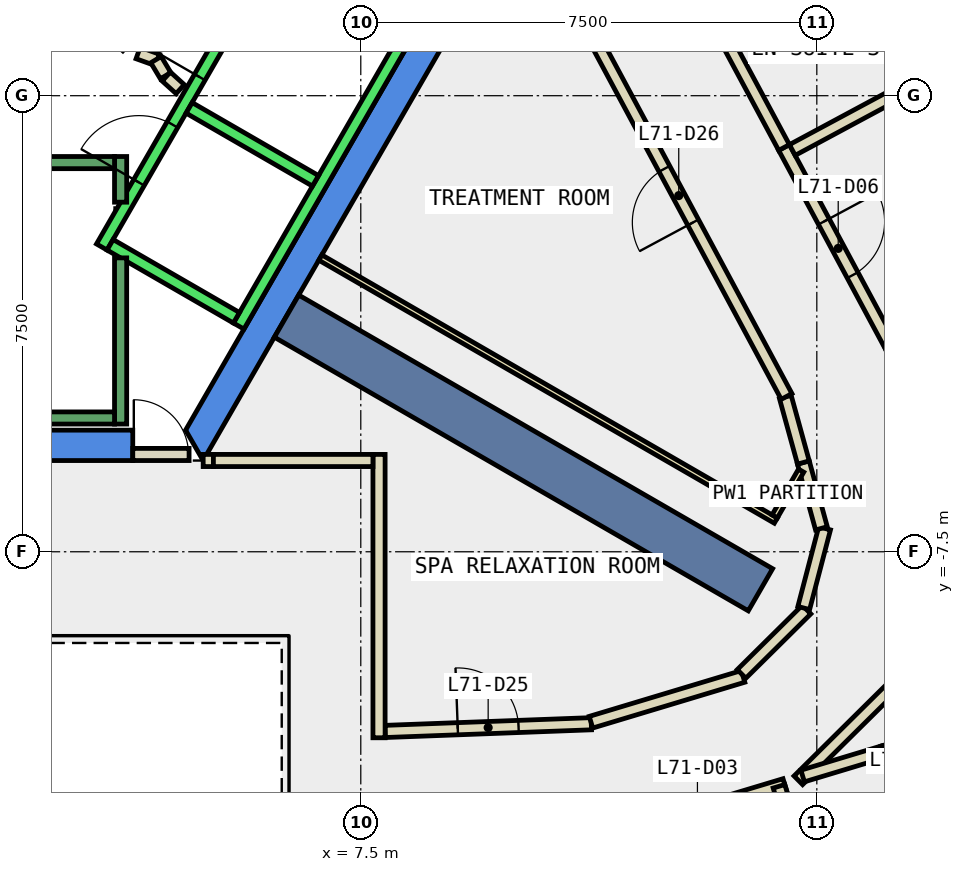
"""IFC4 building model, lengths in metres.
Left out: names, types, materials, properties, quantities, classifications, styles, units other than length and angle.
Written with IfcOpenShell. Run it as: python <this file> out.ifc"""

import sys

from ifc_helpers import new_model, si_unit, direction, frame, frame_2d, origin, place, context, subcontext, project, spatial, polyline, rectangle, outline, extrude, element, fill, save


model = new_model("IFC4")
c1 = context("Model", 3, precision=1e-05, world=origin(), true_north=direction((0.0, 1.0)))
c2 = subcontext(c1, "Body", "Model", "MODEL_VIEW")
j1 = project(units=[si_unit("LENGTHUNIT", "METRE"), si_unit("PLANEANGLEUNIT", "RADIAN")], contexts=[c1])
p1 = place(None, origin())
s1 = spatial("IfcSite", under=j1, at=p1, CompositionType="ELEMENT")
p2 = place(p1, origin())
s2 = spatial("IfcBuilding", under=s1, at=p2, CompositionType="ELEMENT")
p3 = place(p2, frame((0.0, 0.0, 304.4)))
s3 = spatial("IfcBuildingStorey", under=s2, at=p3, CompositionType="ELEMENT", Elevation=304.4)
p4 = place(p3, frame((0.0, 0.0, -0.34)))
e1 = element("IfcWall", 1, at=p4, inside=s3, PredefinedType="SHEAR", context=c2, shape_type="SweptSolid", body=[
    extrude(outline(polyline([(3.75, -6.0), (3.75, -5.5), (-4.619, -5.5), (-4.907, -6.0), (3.75, -6.0)])), origin(), (0.0, 0.0, 1.0), 3.6),
])
p5 = place(p3, frame((0.0, 0.0, -0.34)))
e2 = element("IfcWall", 2, at=p5, inside=s3, PredefinedType="SHEAR", context=c2, shape_type="SweptSolid", body=[
    extrude(outline(polyline([(4.907, -6.0), (9.815, 2.5), (9.238, 2.5), (4.619, -5.5), (4.907, -6.0)])), origin(), (0.0, 0.0, 1.0), 3.6),
])
p6 = place(p3, frame((6.279, -3.625, -0.34), z_axis=(0.0, 0.0, 1.0), x_axis=(0.866017533419, -0.500013631625, 0.0)))
e3 = element("IfcWall", 3, at=p6, inside=s3, PredefinedType="SHEAR", context=c2, shape_type="SweptSolid", body=[
    extrude(rectangle(XDim=9.0, YDim=0.8, at=frame_2d((4.5, 0.0))), origin(), (0.0, 0.0, 1.0), 3.6),
])
p7 = place(p3, frame((7.9, -10.455, 0.0), z_axis=(0.0, 0.0, 1.0), x_axis=(0.999297278907, 0.037482640915, 0.0)))
e4 = element("IfcWall", 4, at=p7, inside=s3, PredefinedType="PARTITIONING", context=c2, shape_type="SweptSolid", body=[
    extrude(rectangle(XDim=3.394, YDim=0.2, at=frame_2d((1.697, 0.0))), origin(), (0.0, 0.0, 1.0), 3.26),
])
p8 = place(p7, frame((1.196, 0.0, 0.0)))
e5 = element("IfcOpeningElement", 5, at=p8, cuts=e4, PredefinedType="OPENING", context=c2, shape_type="SweptSolid", body=[
    extrude(rectangle(XDim=1.0, YDim=2.1, at=frame_2d((0.5, 1.05))), frame((0.0, 0.11, 0.0), z_axis=(0.0, -1.0, 0.0), x_axis=(1.0, 0.0, 0.0)), (0.0, 0.0, 1.0), 0.22),
])
p9 = place(p3, frame((11.286, -10.303, 0.0), z_axis=(0.0, 0.0, 1.0), x_axis=(0.957555754851, 0.288248115955, 0.0)))
e6 = element("IfcWall", 6, at=p9, inside=s3, PredefinedType="PARTITIONING", context=c2, shape_type="SweptSolid", body=[
    extrude(rectangle(XDim=2.612, YDim=0.2, at=frame_2d((1.306, 0.0))), origin(), (0.0, 0.0, 1.0), 3.26),
])
p10 = place(p3, frame((13.762, -9.509, 0.0), z_axis=(0.0, 0.0, 1.0), x_axis=(0.710749293824, 0.703445407497, 0.0)))
e7 = element("IfcWall", 7, at=p10, inside=s3, PredefinedType="PARTITIONING", context=c2, shape_type="SweptSolid", body=[
    extrude(rectangle(XDim=1.504, YDim=0.2, at=frame_2d((0.752, 0.0))), origin(), (0.0, 0.0, 1.0), 3.26),
])
p11 = place(p3, frame((14.785, -8.425, 0.0), z_axis=(0.0, 0.0, 1.0), x_axis=(0.253295121261, 0.967389053869, 0.0)))
e8 = element("IfcWall", 8, at=p11, inside=s3, PredefinedType="PARTITIONING", context=c2, shape_type="SweptSolid", body=[
    extrude(rectangle(XDim=1.354, YDim=0.2, at=frame_2d((0.677, 0.0))), origin(), (0.0, 0.0, 1.0), 3.26),
])
p12 = place(p3, frame((15.076, -7.115, 0.0), z_axis=(0.0, 0.0, 1.0), x_axis=(-0.264368116744, 0.964421846937, 0.0)))
e9 = element("IfcWall", 9, at=p12, inside=s3, PredefinedType="PARTITIONING", context=c2, shape_type="SweptSolid", body=[
    extrude(rectangle(XDim=1.123, YDim=0.2, at=frame_2d((0.562, 0.0))), origin(), (0.0, 0.0, 1.0), 3.26),
])
p13 = place(p3, frame((14.779, -6.032, 0.0), z_axis=(0.0, 0.0, 1.0), x_axis=(-0.265740072272, 0.964044715762, 0.0)))
e10 = element("IfcWall", 10, at=p13, inside=s3, PredefinedType="PARTITIONING", context=c2, shape_type="SweptSolid", body=[
    extrude(rectangle(XDim=1.118, YDim=0.2, at=frame_2d((0.559, 0.0))), origin(), (0.0, 0.0, 1.0), 3.26),
])
p14 = place(p3, frame((14.503, -4.946, 0.0), z_axis=(0.0, 0.0, 1.0), x_axis=(-0.473101362557, 0.881008002658, 0.0)))
e11 = element("IfcWall", 11, at=p14, inside=s3, PredefinedType="PARTITIONING", context=c2, shape_type="SweptSolid", body=[
    extrude(rectangle(XDim=7.497, YDim=0.2, at=frame_2d((3.749, 0.0))), origin(), (0.0, 0.0, 1.0), 3.26),
])
p15 = place(p14, frame((3.249, 0.0, 0.0)))
e12 = element("IfcOpeningElement", 12, at=p15, cuts=e11, PredefinedType="OPENING", context=c2, shape_type="SweptSolid", body=[
    extrude(rectangle(XDim=1.0, YDim=2.1, at=frame_2d((0.5, 1.05))), frame((0.0, 0.11, 0.0), z_axis=(0.0, -1.0, 0.0), x_axis=(1.0, 0.0, 0.0)), (0.0, 0.0, 1.0), 0.22),
])
p16 = place(p3, frame((14.473, -11.328, 0.0), z_axis=(0.0, 0.0, 1.0), x_axis=(-0.957599689503, -0.288102125406, 0.0)))
e13 = element("IfcWall", 13, at=p16, inside=s3, PredefinedType="PARTITIONING", context=c2, shape_type="SweptSolid", body=[
    extrude(rectangle(XDim=2.999, YDim=0.2, at=frame_2d((1.5, 0.0))), origin(), (0.0, 0.0, 1.0), 3.26),
])
p17 = place(p16, frame((1.0, 0.0, 0.0)))
e14 = element("IfcOpeningElement", 14, at=p17, cuts=e13, PredefinedType="OPENING", context=c2, shape_type="SweptSolid", body=[
    extrude(rectangle(XDim=1.0, YDim=2.1, at=frame_2d((0.5, 1.05))), frame((0.0, 0.11, 0.0), z_axis=(0.0, -1.0, 0.0), x_axis=(1.0, 0.0, 0.0)), (0.0, 0.0, 1.0), 0.22),
])
p18 = place(p3, frame((16.537, -9.436, 0.0), z_axis=(0.0, 0.0, 1.0), x_axis=(-0.710773151724, -0.703421301063, 0.0)))
e15 = element("IfcWall", 15, at=p18, inside=s3, PredefinedType="PARTITIONING", context=c2, shape_type="SweptSolid", body=[
    extrude(rectangle(XDim=2.59, YDim=0.2, at=frame_2d((1.295, 0.0))), origin(), (0.0, 0.0, 1.0), 3.26),
])
p19 = place(p3, frame((14.461, -0.852, 0.0), z_axis=(0.0, 0.0, 1.0), x_axis=(0.473160180459, -0.88097641491, 0.0)))
e16 = element("IfcWall", 16, at=p19, inside=s3, PredefinedType="PARTITIONING", context=c2, shape_type="SweptSolid", body=[
    extrude(rectangle(XDim=3.766, YDim=0.2, at=frame_2d((1.883, 0.0))), origin(), (0.0, 0.0, 1.0), 3.26),
])
p20 = place(p19, frame((1.383, 0.0, 0.0)))
e17 = element("IfcOpeningElement", 17, at=p20, cuts=e16, PredefinedType="OPENING", context=c2, shape_type="SweptSolid", body=[
    extrude(rectangle(XDim=1.0, YDim=2.1, at=frame_2d((0.5, 1.05))), frame((0.0, 0.11, 0.0), z_axis=(0.0, -1.0, 0.0), x_axis=(1.0, 0.0, 0.0)), (0.0, 0.0, 1.0), 0.22),
])
p21 = place(p3, frame((12.947, 1.967, 0.0), z_axis=(0.0, 0.0, 1.0), x_axis=(0.473116768279, -0.88099972961, 0.0)))
e18 = element("IfcWall", 18, at=p21, inside=s3, PredefinedType="PARTITIONING", context=c2, shape_type="SweptSolid", body=[
    extrude(rectangle(XDim=3.2, YDim=0.2, at=frame_2d((1.6, 0.0))), origin(), (0.0, 0.0, 1.0), 3.26),
])
p22 = place(p3, frame((3.838, 0.702, 0.0), z_axis=(0.0, 0.0, 1.0), x_axis=(0.941035081519, -0.338308993895, 0.0)))
e19 = element("IfcWall", 19, at=p22, inside=s3, PredefinedType="PARTITIONING", context=c2, shape_type="SweptSolid", body=[
    extrude(rectangle(XDim=0.337, YDim=0.2, at=frame_2d((0.168, 0.0))), origin(), (0.0, 0.0, 1.0), 3.26),
])
p23 = place(p3, frame((4.132, 0.593, 0.0), z_axis=(0.0, 0.0, 1.0), x_axis=(0.513561617048, -0.858052717201, 0.0)))
e20 = element("IfcWall", 20, at=p23, inside=s3, PredefinedType="PARTITIONING", context=c2, shape_type="SweptSolid", body=[
    extrude(rectangle(XDim=0.308, YDim=0.2, at=frame_2d((0.154, 0.0))), origin(), (0.0, 0.0, 1.0), 3.26),
])
p24 = place(p3, frame((4.301, 0.315, 0.0), z_axis=(0.0, 0.0, 1.0), x_axis=(0.741798017506, -0.670623367639, 0.0)))
e21 = element("IfcWall", 21, at=p24, inside=s3, PredefinedType="PARTITIONING", context=c2, shape_type="SweptSolid", body=[
    extrude(rectangle(XDim=0.309, YDim=0.2, at=frame_2d((0.154, 0.0))), origin(), (0.0, 0.0, 1.0), 3.26),
])
p25 = place(p3, frame((4.908, -5.999, 0.0), z_axis=(0.0, 0.0, 1.0), x_axis=(1.0, 0.0, 0.0)))
e22 = element("IfcWall", 22, at=p25, inside=s3, PredefinedType="PARTITIONING", context=c2, shape_type="SweptSolid", body=[
    extrude(rectangle(XDim=0.168, YDim=0.2, at=frame_2d((0.084, 0.0))), origin(), (0.0, 0.0, 1.0), 2.4),
])
p26 = place(p3, frame((7.8, -5.899, 0.0), z_axis=(0.0, 0.0, 1.0), x_axis=(0.0, -1.0, 0.0)))
e23 = element("IfcWall", 23, at=p26, inside=s3, PredefinedType="PARTITIONING", context=c2, shape_type="SweptSolid", body=[
    extrude(rectangle(XDim=4.66, YDim=0.2, at=frame_2d((2.33, 0.0))), origin(), (0.0, 0.0, 1.0), 3.26),
])
p27 = place(p3, frame((6.835, -2.662, 0.0), z_axis=(0.0, 0.0, 1.0), x_axis=(0.866023427642, -0.500003422764, 0.0)))
e24 = element("IfcWall", 24, at=p27, inside=s3, PredefinedType="PARTITIONING", context=c2, shape_type="SweptSolid", body=[
    extrude(rectangle(XDim=8.65, YDim=0.1, at=frame_2d((4.325, 0.0))), origin(), (0.0, 0.0, 1.0), 3.26),
])
p28 = place(p3, frame((14.307, -6.919, 0.0), z_axis=(0.0, 0.0, 1.0), x_axis=(0.500305662732, 0.865848857387, 0.0)))
e25 = element("IfcWall", 25, at=p28, inside=s3, PredefinedType="PARTITIONING", context=c2, shape_type="SweptSolid", body=[
    extrude(rectangle(XDim=0.87, YDim=0.1, at=frame_2d((0.435, 0.0))), origin(), (0.0, 0.0, 1.0), 3.26),
])
p29 = place(p3, frame((14.378, -11.357, 0.0), z_axis=(0.0, 0.0, 1.0), x_axis=(0.287932252498, -0.957650780802, 0.0)))
e26 = element("IfcWall", 26, at=p29, inside=s3, PredefinedType="PARTITIONING", context=c2, shape_type="SweptSolid", body=[
    extrude(rectangle(XDim=2.3, YDim=0.2, at=frame_2d((1.15, 0.0))), origin(), (0.0, 0.0, 1.0), 3.26),
])
p30 = place(p3, frame((16.917, -13.203, 0.0), z_axis=(0.0, 0.0, 1.0), x_axis=(-0.287998855134, 0.957630753183, 0.0)))
e27 = element("IfcWall", 27, at=p30, inside=s3, PredefinedType="PARTITIONING", context=c2, shape_type="SweptSolid", body=[
    extrude(rectangle(XDim=2.649, YDim=0.2, at=frame_2d((1.325, 0.0))), origin(), (0.0, 0.0, 1.0), 3.26),
])
p31 = place(p30, frame((0.875, 0.0, 0.0)))
e28 = element("IfcOpeningElement", 28, at=p31, cuts=e27, PredefinedType="OPENING", context=c2, shape_type="SweptSolid", body=[
    extrude(rectangle(XDim=0.9, YDim=2.1, at=frame_2d((0.45, 1.05))), frame((0.0, 0.11, 0.0), z_axis=(0.0, -1.0, 0.0), x_axis=(1.0, 0.0, 0.0)), (0.0, 0.0, 1.0), 0.22),
])
p32 = place(p3, frame((16.087, -10.79, 0.0), z_axis=(0.0, 0.0, 1.0), x_axis=(-0.957425655367, -0.288679951581, 0.0)))
e29 = element("IfcWall", 29, at=p32, inside=s3, PredefinedType="PARTITIONING", context=c2, shape_type="SweptSolid", body=[
    extrude(rectangle(XDim=1.378, YDim=0.2, at=frame_2d((0.689, 0.0))), origin(), (0.0, 0.0, 1.0), 3.26),
])
p33 = place(p3, frame((14.597, -0.893, 0.0), z_axis=(0.0, 0.0, 1.0), x_axis=(0.880971229432, 0.473169835168, 0.0)))
e30 = element("IfcWall", 30, at=p33, inside=s3, PredefinedType="PARTITIONING", context=c2, shape_type="SweptSolid", body=[
    extrude(rectangle(XDim=2.599, YDim=0.2, at=frame_2d((1.3, 0.0))), origin(), (0.0, 0.0, 1.0), 3.26),
])
p34 = place(p3, frame((17.023, 0.297, 0.0), z_axis=(0.0, 0.0, 1.0), x_axis=(-0.473247398557, 0.88092956572, 0.0)))
e31 = element("IfcWall", 31, at=p34, inside=s3, PredefinedType="PARTITIONING", context=c2, shape_type="SweptSolid", body=[
    extrude(rectangle(XDim=3.4, YDim=0.2, at=frame_2d((1.7, 0.0))), origin(), (0.0, 0.0, 1.0), 3.26),
])
p35 = place(p34, frame((1.25, 0.0, 0.0)))
e32 = element("IfcOpeningElement", 32, at=p35, cuts=e31, PredefinedType="OPENING", context=c2, shape_type="SweptSolid", body=[
    extrude(rectangle(XDim=0.9, YDim=2.1, at=frame_2d((0.45, 1.05))), frame((0.0, 0.11, 0.0), z_axis=(0.0, -1.0, 0.0), x_axis=(1.0, 0.0, 0.0)), (0.0, 0.0, 1.0), 0.22),
])
p36 = place(p3, frame((3.75, -5.9, 0.0), z_axis=(0.0, 0.0, 1.0), x_axis=(1.0, 0.0, 0.0)))
e33 = element("IfcWall", 33, at=p36, inside=s3, PredefinedType="PARTITIONING", context=c2, shape_type="SweptSolid", body=[
    extrude(rectangle(XDim=0.926, YDim=0.2, at=frame_2d((0.463, 0.0))), origin(), (0.0, 0.0, 1.0), 2.4),
])
p37 = place(p36, frame((0.017, 0.0, 0.0)))
e34 = element("IfcOpeningElement", 34, at=p37, cuts=e33, PredefinedType="OPENING", context=c2, shape_type="SweptSolid", body=[
    extrude(rectangle(XDim=0.9, YDim=2.1, at=frame_2d((0.45, 1.05))), frame((0.0, 0.11, 0.0), z_axis=(0.0, -1.0, 0.0), x_axis=(1.0, 0.0, 0.0)), (0.0, 0.0, 1.0), 0.22),
])
p38 = place(p3, frame((5.076, -5.999, 0.0), z_axis=(0.0, 0.0, 1.0), x_axis=(1.0, 0.0, 0.0)))
e35 = element("IfcWall", 35, at=p38, inside=s3, PredefinedType="PARTITIONING", context=c2, shape_type="SweptSolid", body=[
    extrude(rectangle(XDim=2.624, YDim=0.2, at=frame_2d((1.312, 0.0))), origin(), (0.0, 0.0, 1.0), 3.26),
])
p39 = place(p3, frame((3.24, -2.488, 0.0), z_axis=(0.0, 0.0, 1.0), x_axis=(0.500034260056, 0.866005622828, 0.0)))
e36 = element("IfcWall", 36, at=p39, inside=s3, PredefinedType="STANDARD", context=c2, shape_type="SweptSolid", body=[
    extrude(rectangle(XDim=5.399, YDim=0.2, at=frame_2d((2.7, 0.0))), origin(), (0.0, 0.0, 1.0), 3.26),
])
p40 = place(p39, frame((3.225, 0.0, 0.0)))
e37 = element("IfcOpeningElement", 37, at=p40, cuts=e36, PredefinedType="OPENING", context=c2, shape_type="SweptSolid", body=[
    extrude(rectangle(XDim=1.1, YDim=2.1, at=frame_2d((0.55, 1.05))), frame((0.0, 0.11, 0.0), z_axis=(0.0, -1.0, 0.0), x_axis=(1.0, 0.0, 0.0)), (0.0, 0.0, 1.0), 0.22),
])
p41 = place(p39, frame((1.225, 0.0, 0.0)))
e38 = element("IfcOpeningElement", 38, at=p41, cuts=e36, PredefinedType="OPENING", context=c2, shape_type="SweptSolid", body=[
    extrude(rectangle(XDim=1.1, YDim=2.1, at=frame_2d((0.55, 1.05))), frame((0.0, 0.11, 0.0), z_axis=(0.0, -1.0, 0.0), x_axis=(1.0, 0.0, 0.0)), (0.0, 0.0, 1.0), 0.22),
])
p42 = place(p3, frame((5.492, -3.788, 0.0), z_axis=(0.0, 0.0, 1.0), x_axis=(0.500034260056, 0.866005622828, 0.0)))
e39 = element("IfcWall", 39, at=p42, inside=s3, PredefinedType="STANDARD", context=c2, shape_type="SweptSolid", body=[
    extrude(rectangle(XDim=5.399, YDim=0.2, at=frame_2d((2.7, 0.0))), origin(), (0.0, 0.0, 1.0), 3.26),
])
p43 = place(p3, frame((3.377, -2.452, 0.0), z_axis=(0.0, 0.0, 1.0), x_axis=(0.865955154139, -0.50012165622, 0.0)))
e40 = element("IfcWall", 40, at=p43, inside=s3, PredefinedType="STANDARD", context=c2, shape_type="SweptSolid", body=[
    extrude(rectangle(XDim=2.4, YDim=0.2, at=frame_2d((1.2, 0.0))), origin(), (0.0, 0.0, 1.0), 3.26),
])
p44 = place(p3, frame((4.677, -0.2, 0.0), z_axis=(0.0, 0.0, 1.0), x_axis=(0.865973769406, -0.500089422704, 0.0)))
e41 = element("IfcWall", 41, at=p44, inside=s3, PredefinedType="STANDARD", context=c2, shape_type="SweptSolid", body=[
    extrude(rectangle(XDim=2.399, YDim=0.2, at=frame_2d((1.2, 0.0))), origin(), (0.0, 0.0, 1.0), 3.26),
])
p45 = place(p3, frame((3.55, -2.667, 0.0), z_axis=(0.0, 0.0, 1.0), x_axis=(0.0, -1.0, 0.0)))
e42 = element("IfcWall", 42, at=p45, inside=s3, PredefinedType="STANDARD", context=c2, shape_type="SweptSolid", body=[
    extrude(rectangle(XDim=2.733, YDim=0.2, at=frame_2d((1.366, 0.0))), origin(), (0.0, 0.0, 1.0), 3.26),
])
p46 = place(p3, frame((3.55, -1.0, 0.0), z_axis=(0.0, 0.0, 1.0), x_axis=(0.0, -1.0, 0.0)))
e43 = element("IfcWall", 43, at=p46, inside=s3, PredefinedType="STANDARD", context=c2, shape_type="SweptSolid", body=[
    extrude(rectangle(XDim=0.751, YDim=0.2, at=frame_2d((0.375, 0.0))), origin(), (0.0, 0.0, 1.0), 3.26),
])
p47 = place(p3, frame((-3.45, -1.1, 0.0), z_axis=(0.0, 0.0, 1.0), x_axis=(1.0, 0.0, 0.0)))
e44 = element("IfcWall", 44, at=p47, inside=s3, PredefinedType="STANDARD", context=c2, shape_type="SweptSolid", body=[
    extrude(rectangle(XDim=6.9, YDim=0.2, at=frame_2d((3.45, 0.0))), origin(), (0.0, 0.0, 1.0), 3.26),
])
p48 = place(p47, frame((0.45, 0.0, 0.0)))
e45 = element("IfcOpeningElement", 45, at=p48, cuts=e44, PredefinedType="OPENING", context=c2, shape_type="SweptSolid", body=[
    extrude(rectangle(XDim=1.1, YDim=2.2, at=frame_2d((0.55, 1.1))), frame((0.0, 0.11, 0.0), z_axis=(0.0, -1.0, 0.0), x_axis=(1.0, 0.0, 0.0)), (0.0, 0.0, 1.0), 0.22),
])
p49 = place(p3, frame((-3.45, -5.3, 0.0), z_axis=(0.0, 0.0, 1.0), x_axis=(1.0, 0.0, 0.0)))
e46 = element("IfcWall", 46, at=p49, inside=s3, PredefinedType="STANDARD", context=c2, shape_type="SweptSolid", body=[
    extrude(rectangle(XDim=6.9, YDim=0.2, at=frame_2d((3.45, 0.0))), origin(), (0.0, 0.0, 1.0), 3.26),
])
p50 = place(p20, origin())
e47 = element("IfcDoor", 47, at=p50, inside=s3, OperationType="SINGLE_SWING_LEFT", PredefinedType="DOOR", context=c2, shape_type="SweptSolid", body=[
    extrude(rectangle(XDim=1.0, YDim=2.1, at=frame_2d((0.5, 1.05))), frame((0.0, 0.025, 0.0), z_axis=(0.0, -1.0, 0.0), x_axis=(1.0, 0.0, 0.0)), (0.0, 0.0, 1.0), 0.05),
])
fill(e17, e47)
p51 = place(p8, origin())
e48 = element("IfcDoor", 48, at=p51, inside=s3, OperationType="SINGLE_SWING_LEFT", PredefinedType="DOOR", context=c2, shape_type="SweptSolid", body=[
    extrude(rectangle(XDim=1.0, YDim=2.1, at=frame_2d((0.5, 1.05))), frame((0.0, 0.025, 0.0), z_axis=(0.0, -1.0, 0.0), x_axis=(1.0, 0.0, 0.0)), (0.0, 0.0, 1.0), 0.05),
])
fill(e5, e48)
p52 = place(p15, origin())
e49 = element("IfcDoor", 49, at=p52, inside=s3, OperationType="SINGLE_SWING_LEFT", PredefinedType="DOOR", context=c2, shape_type="SweptSolid", body=[
    extrude(rectangle(XDim=1.0, YDim=2.1, at=frame_2d((0.5, 1.05))), frame((0.0, 0.025, 0.0), z_axis=(0.0, -1.0, 0.0), x_axis=(1.0, 0.0, 0.0)), (0.0, 0.0, 1.0), 0.05),
])
fill(e12, e49)
p53 = place(p37, origin())
e50 = element("IfcDoor", 50, at=p53, inside=s3, OperationType="SINGLE_SWING_LEFT", PredefinedType="DOOR", context=c2, shape_type="SweptSolid", body=[
    extrude(rectangle(XDim=0.9, YDim=2.1, at=frame_2d((0.45, 1.05))), frame((0.0, 0.025, 0.0), z_axis=(0.0, -1.0, 0.0), x_axis=(1.0, 0.0, 0.0)), (0.0, 0.0, 1.0), 0.05),
])
fill(e34, e50)
p54 = place(p40, origin())
e51 = element("IfcDoor", 51, at=p54, inside=s3, OperationType="SLIDING_TO_LEFT", PredefinedType="DOOR", context=c2, shape_type="SweptSolid", body=[
    extrude(rectangle(XDim=1.1, YDim=2.1, at=frame_2d((0.55, 1.05))), frame((0.0, 0.025, 0.0), z_axis=(0.0, -1.0, 0.0), x_axis=(1.0, 0.0, 0.0)), (0.0, 0.0, 1.0), 0.05),
])
fill(e37, e51)
p55 = place(p41, origin())
e52 = element("IfcDoor", 52, at=p55, inside=s3, OperationType="SLIDING_TO_LEFT", PredefinedType="DOOR", context=c2, shape_type="SweptSolid", body=[
    extrude(rectangle(XDim=1.1, YDim=2.1, at=frame_2d((0.55, 1.05))), frame((0.0, 0.025, 0.0), z_axis=(0.0, -1.0, 0.0), x_axis=(1.0, 0.0, 0.0)), (0.0, 0.0, 1.0), 0.05),
])
fill(e38, e52)
save(model, sys.argv[1])
